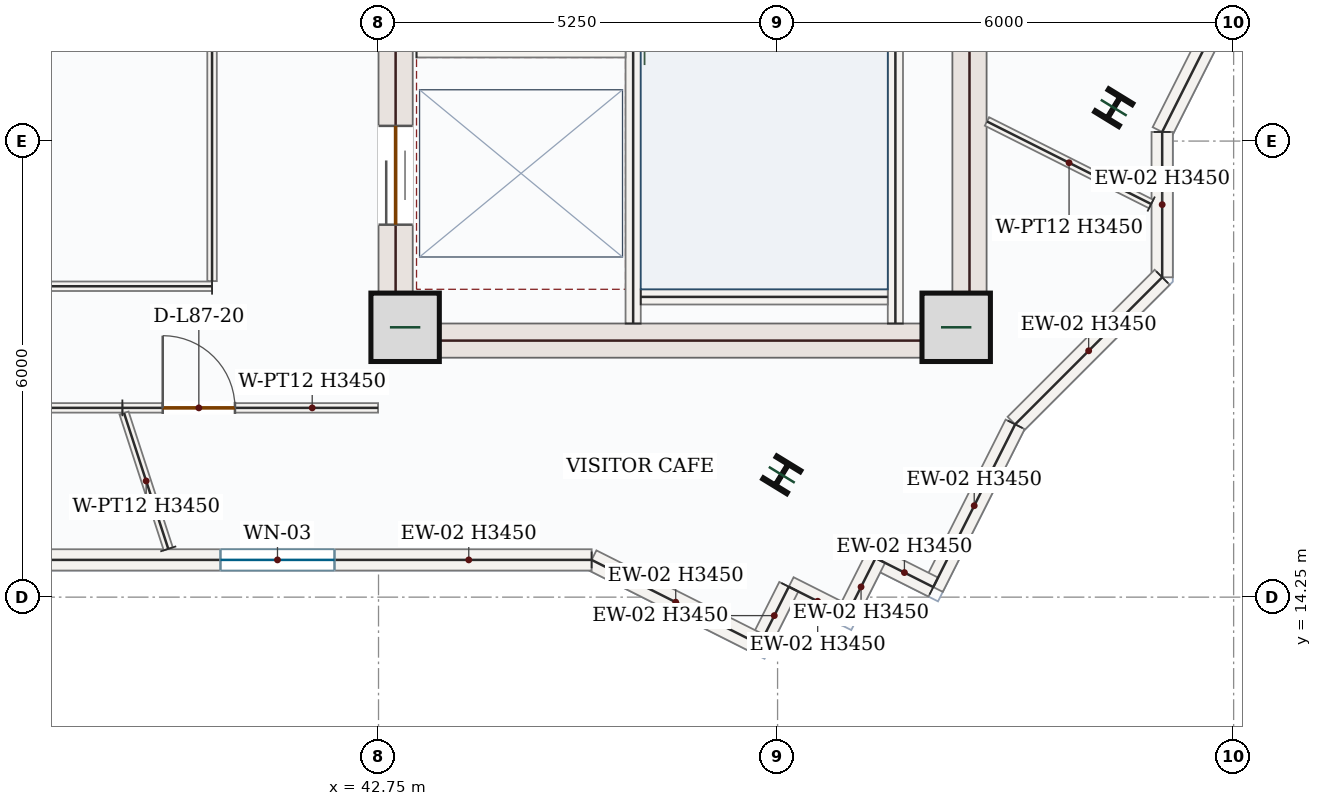
"""IFC4 building model, lengths in metres.
Left out: names, types, materials, properties, quantities, classifications, styles, units other than length and angle.
Written with IfcOpenShell. Run it as: python <this file> out.ifc"""

import sys

from ifc_helpers import new_model, si_unit, direction, frame, frame_2d, origin, origin_2d, place, context, subcontext, project, spatial, rectangle, i_section, extrude, source, transform, mapped, element, fill, save


model = new_model("IFC4")
c1 = context("Model", 3, precision=1e-05, world=origin(), true_north=direction((0.0, 1.0)))
c2 = subcontext(c1, "Body", "Model", "MODEL_VIEW")
j1 = project(units=[si_unit("LENGTHUNIT", "METRE"), si_unit("PLANEANGLEUNIT", "RADIAN")], contexts=[c1])
p1 = place(None, origin())
s1 = spatial("IfcSite", under=j1, at=p1, CompositionType="ELEMENT")
p2 = place(p1, origin())
s2 = spatial("IfcBuilding", under=s1, at=p2, CompositionType="ELEMENT")
p3 = place(p2, frame((0.0, 0.0, 357.3)))
s3 = spatial("IfcBuildingStorey", under=s2, at=p3, CompositionType="ELEMENT", Elevation=357.3)
p4 = place(p3, frame((42.975, 17.4, 0.0), z_axis=(0.0, 0.0, 1.0), x_axis=(0.0, 1.0, 0.0)))
e1 = element("IfcWall", 1, at=p4, inside=s3, PredefinedType="SHEAR", context=c2, shape_type="SweptSolid", body=[
    extrude(rectangle(XDim=8.55, YDim=0.45, at=frame_2d((4.275, 0.0))), origin(), (0.0, 0.0, 1.0), 3.45),
])
p5 = place(p4, frame((6.65, 0.0, 0.0)))
e2 = element("IfcOpeningElement", 2, at=p5, cuts=e1, PredefinedType="OPENING", context=c2, shape_type="SweptSolid", body=[
    extrude(rectangle(XDim=1.1, YDim=2.2, at=frame_2d((0.55, 1.1))), frame((0.0, 0.235, 0.0), z_axis=(0.0, -1.0, 0.0), x_axis=(1.0, 0.0, 0.0)), (0.0, 0.0, 1.0), 0.47),
])
p6 = place(p4, frame((1.75, 0.0, 0.0)))
e3 = element("IfcOpeningElement", 3, at=p6, cuts=e1, PredefinedType="OPENING", context=c2, shape_type="SweptSolid", body=[
    extrude(rectangle(XDim=1.3, YDim=2.2, at=frame_2d((0.65, 1.1))), frame((0.0, 0.235, 0.0), z_axis=(0.0, -1.0, 0.0), x_axis=(1.0, 0.0, 0.0)), (0.0, 0.0, 1.0), 0.47),
])
p7 = place(p4, frame((4.55, 0.0, 0.0)))
e4 = element("IfcOpeningElement", 4, at=p7, cuts=e1, PredefinedType="OPENING", context=c2, shape_type="SweptSolid", body=[
    extrude(rectangle(XDim=0.88, YDim=2.1, at=frame_2d((0.44, 1.05))), frame((0.0, 0.235, 0.0), z_axis=(0.0, -1.0, 0.0), x_axis=(1.0, 0.0, 0.0)), (0.0, 0.0, 1.0), 0.47),
])
m1 = source(origin(), c2, "Body", "SweptSolid", [
    extrude(rectangle(XDim=8.55, YDim=0.45, at=frame_2d((4.275, 0.0))), origin(), (0.0, 0.0, 1.0), 3.45),
])
p8 = place(p3, frame((50.525, 17.4, 0.0), z_axis=(0.0, 0.0, 1.0), x_axis=(0.0, 1.0, 0.0)))
e5 = element("IfcWall", 5, at=p8, inside=s3, PredefinedType="SHEAR", context=c2, shape_type="MappedRepresentation", body=[
    mapped(m1, transform((0.0, 0.0, 0.0), x_axis=(1.0, 0.0, 0.0), y_axis=(0.0, 1.0, 0.0), z_axis=(0.0, 0.0, 1.0), scale=1.0)),
])
m2 = source(origin(), c2, "Body", "SweptSolid", [
    extrude(rectangle(XDim=7.1, YDim=0.45, at=frame_2d((3.55, 0.0))), origin(), (0.0, 0.0, 1.0), 3.45),
])
p9 = place(p3, frame((43.2, 17.625, 0.0), z_axis=(0.0, 0.0, 1.0), x_axis=(1.0, 0.0, 0.0)))
e6 = element("IfcWall", 6, at=p9, inside=s3, PredefinedType="SHEAR", context=c2, shape_type="MappedRepresentation", body=[
    mapped(m2, transform((0.0, 0.0, 0.0), x_axis=(1.0, 0.0, 0.0), y_axis=(0.0, 1.0, 0.0), z_axis=(0.0, 0.0, 1.0), scale=1.0)),
])
m3 = source(origin(), c2, "Body", "SweptSolid", [
    extrude(rectangle(XDim=0.9, YDim=0.9, at=origin_2d()), origin(), (0.0, 0.0, 1.0), 3.75),
])
for number, where, z_axis, x_axis in (
    (7, (43.1, 17.8, 0.0), (0.0, 0.0, 1.0), (1.0, 0.0, 0.0)),
    (8, (50.35, 17.8, 0.0), (0.0, 0.0, 1.0), (1.0, 0.0, 0.0)),
):
    element("IfcColumn", number, at=place(p3, frame(where, z_axis=z_axis, x_axis=x_axis)), inside=s3, PredefinedType="COLUMN", context=c2, shape_type="MappedRepresentation", body=[
        mapped(m3, transform((0.0, 0.0, 0.0), x_axis=(1.0, 0.0, 0.0), y_axis=(0.0, 1.0, 0.0), z_axis=(0.0, 0.0, 1.0), scale=1.0)),
    ])
m4 = source(origin(), c2, "Body", "SweptSolid", [
    extrude(i_section(OverallWidth=0.369, OverallDepth=0.356, WebThickness=0.011, FlangeThickness=0.018, FilletRadius=0.018, at=origin_2d()), origin(), (0.0, 0.0, 1.0), 3.75),
])
for number, where, z_axis, x_axis in (
    (9, (48.055, 15.859, 0.0), (0.0, 0.0, 1.0), (-0.853, 0.522, 0.0)),
    (10, (52.423, 20.689, 0.0), (0.0, 0.0, 1.0), (-0.853, 0.522, 0.0)),
):
    element("IfcColumn", number, at=place(p3, frame(where, z_axis=z_axis, x_axis=x_axis)), inside=s3, PredefinedType="COLUMN", context=c2, shape_type="MappedRepresentation", body=[
        mapped(m4, transform((0.0, 0.0, 0.0), x_axis=(1.0, 0.0, 0.0), y_axis=(0.0, 1.0, 0.0), z_axis=(0.0, 0.0, 1.0), scale=1.0)),
    ])
m5 = source(origin(), c2, "Body", "SweptSolid", [
    extrude(rectangle(XDim=3.218, YDim=0.28, at=frame_2d((1.609, 0.0))), origin(), (0.0, 0.0, 1.0), 3.45),
])
p10 = place(p3, frame((54.506, 23.244, 0.0), z_axis=(0.0, 0.0, 1.0), x_axis=(-0.449336858059, -0.89336240574, 0.0)))
e11 = element("IfcWall", 11, at=p10, inside=s3, PredefinedType="SOLIDWALL", context=c2, shape_type="MappedRepresentation", body=[
    mapped(m5, transform((0.0, 0.0, 0.0), x_axis=(1.0, 0.0, 0.0), y_axis=(0.0, 1.0, 0.0), z_axis=(0.0, 0.0, 1.0), scale=1.0)),
])
m6 = source(origin(), c2, "Body", "SweptSolid", [
    extrude(rectangle(XDim=1.912, YDim=0.28, at=frame_2d((0.956, 0.0))), origin(), (0.0, 0.0, 1.0), 3.45),
])
p11 = place(p3, frame((53.06, 20.37, 0.0), z_axis=(0.0, 0.0, 1.0), x_axis=(0.0, -1.0, 0.0)))
e12 = element("IfcWall", 12, at=p11, inside=s3, PredefinedType="SOLIDWALL", context=c2, shape_type="MappedRepresentation", body=[
    mapped(m6, transform((0.0, 0.0, 0.0), x_axis=(1.0, 0.0, 0.0), y_axis=(0.0, 1.0, 0.0), z_axis=(0.0, 0.0, 1.0), scale=1.0)),
])
m7 = source(origin(), c2, "Body", "SweptSolid", [
    extrude(rectangle(XDim=2.736, YDim=0.28, at=frame_2d((1.368, 0.0))), origin(), (0.0, 0.0, 1.0), 3.45),
])
p12 = place(p3, frame((53.06, 18.458, 0.0), z_axis=(0.0, 0.0, 1.0), x_axis=(-0.707106781187, -0.707106781187, 0.0)))
e13 = element("IfcWall", 13, at=p12, inside=s3, PredefinedType="SOLIDWALL", context=c2, shape_type="MappedRepresentation", body=[
    mapped(m7, transform((0.0, 0.0, 0.0), x_axis=(1.0, 0.0, 0.0), y_axis=(0.0, 1.0, 0.0), z_axis=(0.0, 0.0, 1.0), scale=1.0)),
])
m8 = source(origin(), c2, "Body", "SweptSolid", [
    extrude(rectangle(XDim=2.397, YDim=0.28, at=frame_2d((1.198, 0.0))), origin(), (0.0, 0.0, 1.0), 3.45),
])
p13 = place(p3, frame((51.125, 16.523, 0.0), z_axis=(0.0, 0.0, 1.0), x_axis=(-0.449331154558, -0.893365274422, 0.0)))
e14 = element("IfcWall", 14, at=p13, inside=s3, PredefinedType="SOLIDWALL", context=c2, shape_type="MappedRepresentation", body=[
    mapped(m8, transform((0.0, 0.0, 0.0), x_axis=(1.0, 0.0, 0.0), y_axis=(0.0, 1.0, 0.0), z_axis=(0.0, 0.0, 1.0), scale=1.0)),
])
m9 = source(origin(), c2, "Body", "SweptSolid", [
    extrude(rectangle(XDim=0.85, YDim=0.28, at=frame_2d((0.425, 0.0))), origin(), (0.0, 0.0, 1.0), 3.45),
])
p14 = place(p3, frame((50.049, 14.382, 0.0), z_axis=(0.0, 0.0, 1.0), x_axis=(-0.89339064965, 0.449280699695, 0.0)))
e15 = element("IfcWall", 15, at=p14, inside=s3, PredefinedType="SOLIDWALL", context=c2, shape_type="MappedRepresentation", body=[
    mapped(m9, transform((0.0, 0.0, 0.0), x_axis=(1.0, 0.0, 0.0), y_axis=(0.0, 1.0, 0.0), z_axis=(0.0, 0.0, 1.0), scale=1.0)),
])
m10 = source(origin(), c2, "Body", "SweptSolid", [
    extrude(rectangle(XDim=0.85, YDim=0.28, at=frame_2d((0.425, 0.0))), origin(), (0.0, 0.0, 1.0), 3.45),
])
p15 = place(p3, frame((49.289, 14.764, 0.0), z_axis=(0.0, 0.0, 1.0), x_axis=(-0.449509934066, -0.893275332233, 0.0)))
e16 = element("IfcWall", 16, at=p15, inside=s3, PredefinedType="SOLIDWALL", context=c2, shape_type="MappedRepresentation", body=[
    mapped(m10, transform((0.0, 0.0, 0.0), x_axis=(1.0, 0.0, 0.0), y_axis=(0.0, 1.0, 0.0), z_axis=(0.0, 0.0, 1.0), scale=1.0)),
])
for number, where, z_axis, x_axis in (
    (17, (48.907, 14.005, 0.0), (0.0, 0.0, 1.0), (-0.893, 0.449, 0.0)),
    (18, (48.148, 14.387, 0.0), (0.0, 0.0, 1.0), (-0.449, -0.893, 0.0)),
):
    element("IfcWall", number, at=place(p3, frame(where, z_axis=z_axis, x_axis=x_axis)), inside=s3, PredefinedType="SOLIDWALL", context=c2, shape_type="MappedRepresentation", body=[
        mapped(m9, transform((0.0, 0.0, 0.0), x_axis=(1.0, 0.0, 0.0), y_axis=(0.0, 1.0, 0.0), z_axis=(0.0, 0.0, 1.0), scale=1.0)),
    ])
m11 = source(origin(), c2, "Body", "SweptSolid", [
    extrude(rectangle(XDim=2.476, YDim=0.28, at=frame_2d((1.238, 0.0))), origin(), (0.0, 0.0, 1.0), 3.45),
])
p16 = place(p3, frame((47.766, 13.627, 0.0), z_axis=(0.0, 0.0, 1.0), x_axis=(-0.893399530761, 0.449263039249, 0.0)))
e19 = element("IfcWall", 19, at=p16, inside=s3, PredefinedType="SOLIDWALL", context=c2, shape_type="MappedRepresentation", body=[
    mapped(m11, transform((0.0, 0.0, 0.0), x_axis=(1.0, 0.0, 0.0), y_axis=(0.0, 1.0, 0.0), z_axis=(0.0, 0.0, 1.0), scale=1.0)),
])
p17 = place(p3, frame((45.554, 14.74, 0.0), z_axis=(0.0, 0.0, 1.0), x_axis=(-1.0, 0.0, 0.0)))
e20 = element("IfcWall", 20, at=p17, inside=s3, PredefinedType="SOLIDWALL", context=c2, shape_type="SweptSolid", body=[
    extrude(rectangle(XDim=8.265, YDim=0.28, at=frame_2d((4.132, 0.0))), origin(), (0.0, 0.0, 1.0), 3.45),
])
p18 = place(p17, frame((3.383, 0.0, 0.85)))
e21 = element("IfcOpeningElement", 21, at=p18, cuts=e20, PredefinedType="OPENING", context=c2, shape_type="SweptSolid", body=[
    extrude(rectangle(XDim=1.5, YDim=1.5, at=frame_2d((0.75, 0.75))), frame((0.0, 0.15, 0.0), z_axis=(0.0, -1.0, 0.0), x_axis=(1.0, 0.0, 0.0)), (0.0, 0.0, 1.0), 0.3),
])
m12 = source(origin(), c2, "Body", "SweptSolid", [
    extrude(rectangle(XDim=7.87, YDim=0.2, at=frame_2d((3.935, 0.0))), origin(), (0.0, 0.0, 1.0), 3.45),
])
p19 = place(p3, frame((49.55, 17.85, 0.0), z_axis=(0.0, 0.0, 1.0), x_axis=(0.0, 1.0, 0.0)))
e22 = element("IfcWall", 22, at=p19, inside=s3, PredefinedType="SOLIDWALL", context=c2, shape_type="MappedRepresentation", body=[
    mapped(m12, transform((0.0, 0.0, 0.0), x_axis=(1.0, 0.0, 0.0), y_axis=(0.0, 1.0, 0.0), z_axis=(0.0, 0.0, 1.0), scale=1.0)),
])
p20 = place(p3, frame((46.1, 17.85, 0.0), z_axis=(0.0, 0.0, 1.0), x_axis=(0.0, 1.0, 0.0)))
e23 = element("IfcWall", 23, at=p20, inside=s3, PredefinedType="SOLIDWALL", context=c2, shape_type="SweptSolid", body=[
    extrude(rectangle(XDim=8.0, YDim=0.2, at=frame_2d((4.0, 0.0))), origin(), (0.0, 0.0, 1.0), 3.45),
])
p21 = place(p20, frame((6.3, 0.0, 0.0)))
e24 = element("IfcOpeningElement", 24, at=p21, cuts=e23, PredefinedType="OPENING", context=c2, shape_type="SweptSolid", body=[
    extrude(rectangle(XDim=1.05, YDim=2.15, at=frame_2d((0.525, 1.075))), frame((0.0, 0.11, 0.0), z_axis=(0.0, -1.0, 0.0), x_axis=(1.0, 0.0, 0.0)), (0.0, 0.0, 1.0), 0.22),
])
m13 = source(origin(), c2, "Body", "SweptSolid", [
    extrude(rectangle(XDim=3.25, YDim=0.2, at=frame_2d((1.625, 0.0))), origin(), (0.0, 0.0, 1.0), 3.45),
])
p22 = place(p3, frame((46.2, 18.2, 0.0), z_axis=(0.0, 0.0, 1.0), x_axis=(1.0, 0.0, 0.0)))
e25 = element("IfcWall", 25, at=p22, inside=s3, PredefinedType="SOLIDWALL", context=c2, shape_type="MappedRepresentation", body=[
    mapped(m13, transform((0.0, 0.0, 0.0), x_axis=(1.0, 0.0, 0.0), y_axis=(0.0, 1.0, 0.0), z_axis=(0.0, 0.0, 1.0), scale=1.0)),
])
m14 = source(origin(), c2, "Body", "SweptSolid", [
    extrude(rectangle(XDim=2.75, YDim=0.2, at=frame_2d((1.375, 0.0))), origin(), (0.0, 0.0, 1.0), 3.45),
])
p23 = place(p3, frame((43.25, 21.45, 0.0), z_axis=(0.0, 0.0, 1.0), x_axis=(1.0, 0.0, 0.0)))
e26 = element("IfcWall", 26, at=p23, inside=s3, PredefinedType="SOLIDWALL", context=c2, shape_type="MappedRepresentation", body=[
    mapped(m14, transform((0.0, 0.0, 0.0), x_axis=(1.0, 0.0, 0.0), y_axis=(0.0, 1.0, 0.0), z_axis=(0.0, 0.0, 1.0), scale=1.0)),
])
m15 = source(origin(), c2, "Body", "SweptSolid", [
    extrude(rectangle(XDim=2.418, YDim=0.125, at=frame_2d((1.209, 0.0))), origin(), (0.0, 0.0, 1.0), 3.45),
])
p24 = place(p3, frame((52.915, 19.422, 0.0), z_axis=(0.0, 0.0, 1.0), x_axis=(-0.893374646663, 0.449312520078, 0.0)))
e27 = element("IfcWall", 27, at=p24, inside=s3, PredefinedType="PARTITIONING", context=c2, shape_type="MappedRepresentation", body=[
    mapped(m15, transform((0.0, 0.0, 0.0), x_axis=(1.0, 0.0, 0.0), y_axis=(0.0, 1.0, 0.0), z_axis=(0.0, 0.0, 1.0), scale=1.0)),
])
p25 = place(p3, frame((39.38, 16.74, 0.0), z_axis=(0.0, 0.0, 1.0), x_axis=(1.0, 0.0, 0.0)))
e28 = element("IfcWall", 28, at=p25, inside=s3, PredefinedType="PARTITIONING", context=c2, shape_type="SweptSolid", body=[
    extrude(rectangle(XDim=3.364, YDim=0.125, at=frame_2d((1.682, 0.0))), origin(), (0.0, 0.0, 1.0), 3.45),
])
p26 = place(p25, frame((0.531, 0.0, 0.0)))
e29 = element("IfcOpeningElement", 29, at=p26, cuts=e28, PredefinedType="OPENING", context=c2, shape_type="SweptSolid", body=[
    extrude(rectangle(XDim=0.95, YDim=2.15, at=frame_2d((0.475, 1.075))), frame((0.0, 0.073, 0.0), z_axis=(0.0, -1.0, 0.0), x_axis=(1.0, 0.0, 0.0)), (0.0, 0.0, 1.0), 0.145),
])
m16 = source(origin(), c2, "Body", "SweptSolid", [
    extrude(rectangle(XDim=1.88, YDim=0.125, at=frame_2d((0.94, 0.0))), origin(), (0.0, 0.0, 1.0), 3.45),
])
p27 = place(p3, frame((39.984, 14.885, 0.0), z_axis=(0.0, 0.0, 1.0), x_axis=(-0.309479545997, 0.950906099786, 0.0)))
e30 = element("IfcWall", 30, at=p27, inside=s3, PredefinedType="PARTITIONING", context=c2, shape_type="MappedRepresentation", body=[
    mapped(m16, transform((0.0, 0.0, 0.0), x_axis=(1.0, 0.0, 0.0), y_axis=(0.0, 1.0, 0.0), z_axis=(0.0, 0.0, 1.0), scale=1.0)),
])
m17 = source(origin(), c2, "Body", "SweptSolid", [
    extrude(rectangle(XDim=9.12, YDim=0.125, at=frame_2d((4.56, 0.0))), origin(), (0.0, 0.0, 1.0), 3.45),
])
p28 = place(p3, frame((40.56, 18.34, 0.0), z_axis=(0.0, 0.0, 1.0), x_axis=(-1.0, 0.0, 0.0)))
e31 = element("IfcWall", 31, at=p28, inside=s3, PredefinedType="PARTITIONING", context=c2, shape_type="MappedRepresentation", body=[
    mapped(m17, transform((0.0, 0.0, 0.0), x_axis=(1.0, 0.0, 0.0), y_axis=(0.0, 1.0, 0.0), z_axis=(0.0, 0.0, 1.0), scale=1.0)),
])
m18 = source(origin(), c2, "Body", "SweptSolid", [
    extrude(rectangle(XDim=7.335, YDim=0.125, at=frame_2d((3.667, 0.0))), origin(), (0.0, 0.0, 1.0), 3.45),
])
p29 = place(p3, frame((40.56, 25.742, 0.0), z_axis=(0.0, 0.0, 1.0), x_axis=(0.0, -1.0, 0.0)))
e32 = element("IfcWall", 32, at=p29, inside=s3, PredefinedType="PARTITIONING", context=c2, shape_type="MappedRepresentation", body=[
    mapped(m18, transform((0.0, 0.0, 0.0), x_axis=(1.0, 0.0, 0.0), y_axis=(0.0, 1.0, 0.0), z_axis=(0.0, 0.0, 1.0), scale=1.0)),
])
p30 = place(p3, frame((29.258, 16.74, 0.0), z_axis=(0.0, 0.0, 1.0), x_axis=(0.999999999709, -2.411847e-05, 0.0)))
e33 = element("IfcWall", 33, at=p30, inside=s3, PredefinedType="PARTITIONING", context=c2, shape_type="SweptSolid", body=[
    extrude(rectangle(XDim=10.123, YDim=0.125, at=frame_2d((5.061, 0.0))), origin(), (0.0, 0.0, 1.0), 3.45),
])
p31 = place(p30, frame((5.962, 0.0, 0.0)))
e34 = element("IfcOpeningElement", 34, at=p31, cuts=e33, PredefinedType="OPENING", context=c2, shape_type="SweptSolid", body=[
    extrude(rectangle(XDim=0.95, YDim=2.15, at=frame_2d((0.475, 1.075))), frame((0.0, 0.073, 0.0), z_axis=(0.0, -1.0, 0.0), x_axis=(1.0, 0.0, 0.0)), (0.0, 0.0, 1.0), 0.145),
])
m19 = source(origin(), c2, "Body", "SweptSolid", [
    extrude(rectangle(XDim=1.5, YDim=1.5, at=frame_2d((0.75, 0.75))), frame((0.0, 0.03, 0.0), z_axis=(0.0, -1.0, 0.0), x_axis=(1.0, 0.0, 0.0)), (0.0, 0.0, 1.0), 0.06),
])
p32 = place(p18, origin())
e35 = element("IfcWindow", 35, at=p32, inside=s3, PartitioningType="SINGLE_PANEL", PredefinedType="WINDOW", context=c2, shape_type="MappedRepresentation", body=[
    mapped(m19, transform((0.0, 0.0, 0.0), x_axis=(1.0, 0.0, 0.0), y_axis=(0.0, 1.0, 0.0), z_axis=(0.0, 0.0, 1.0), scale=1.0)),
])
fill(e21, e35)
m20 = source(origin(), c2, "Body", "SweptSolid", [
    extrude(rectangle(XDim=1.3, YDim=2.2, at=frame_2d((0.65, 1.1))), frame((0.0, 0.025, 0.0), z_axis=(0.0, -1.0, 0.0), x_axis=(1.0, 0.0, 0.0)), (0.0, 0.0, 1.0), 0.05),
])
p33 = place(p6, origin())
e36 = element("IfcDoor", 36, at=p33, inside=s3, OperationType="DOUBLE_DOOR_SLIDING", PredefinedType="DOOR", context=c2, shape_type="MappedRepresentation", body=[
    mapped(m20, transform((0.0, 0.0, 0.0), x_axis=(1.0, 0.0, 0.0), y_axis=(0.0, 1.0, 0.0), z_axis=(0.0, 0.0, 1.0), scale=1.0)),
])
fill(e3, e36)
m21 = source(origin(), c2, "Body", "SweptSolid", [
    extrude(rectangle(XDim=0.95, YDim=2.15, at=frame_2d((0.475, 1.075))), frame((0.0, 0.025, 0.0), z_axis=(0.0, -1.0, 0.0), x_axis=(1.0, 0.0, 0.0)), (0.0, 0.0, 1.0), 0.05),
])
p34 = place(p26, origin())
e37 = element("IfcDoor", 37, at=p34, inside=s3, OperationType="SINGLE_SWING_LEFT", PredefinedType="DOOR", context=c2, shape_type="MappedRepresentation", body=[
    mapped(m21, transform((0.0, 0.0, 0.0), x_axis=(1.0, 0.0, 0.0), y_axis=(0.0, 1.0, 0.0), z_axis=(0.0, 0.0, 1.0), scale=1.0)),
])
fill(e29, e37)
save(model, sys.argv[1])
